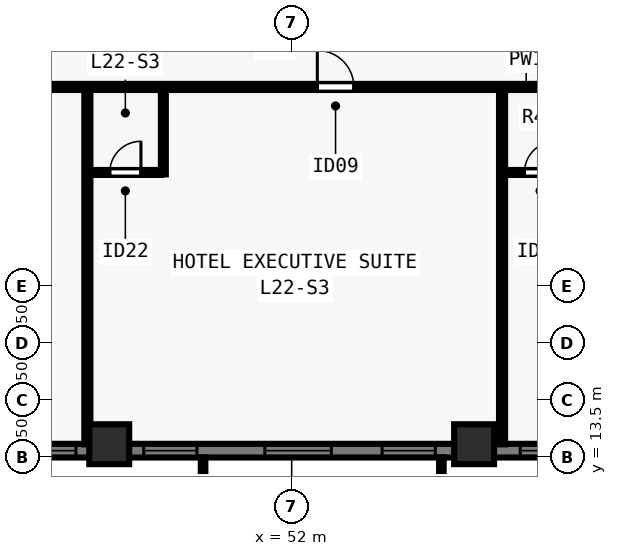
"""IFC4 building model, lengths in metres.
Left out: names, types, materials, properties, quantities, classifications, styles, units other than length and angle.
Written with IfcOpenShell. Run it as: python <this file> out.ifc"""

import sys

from ifc_helpers import new_model, si_unit, direction, frame, frame_2d, origin, origin_2d, place, context, subcontext, project, spatial, rectangle, extrude, element, fill, save


model = new_model("IFC4")
c1 = context("Model", 3, precision=1e-05, world=origin(), true_north=direction((0.0, 1.0)))
c2 = subcontext(c1, "Body", "Model", "MODEL_VIEW")
j1 = project(units=[si_unit("LENGTHUNIT", "METRE"), si_unit("PLANEANGLEUNIT", "RADIAN")], contexts=[c1])
p1 = place(None, origin())
s1 = spatial("IfcSite", under=j1, at=p1, CompositionType="ELEMENT")
p2 = place(p1, origin())
s2 = spatial("IfcBuilding", under=s1, at=p2, CompositionType="ELEMENT")
p3 = place(p2, frame((0.0, 0.0, 83.0)))
s3 = spatial("IfcBuildingStorey", under=s2, at=p3, CompositionType="ELEMENT", Elevation=83.0)
for number, where, z_axis, x_axis in (
    (1, (47.2, 13.85, 0.0), (0.0, 0.0, 1.0), (1.0, 0.0, 0.0)),
    (2, (56.8, 13.85, 0.0), (0.0, 0.0, 1.0), (1.0, 0.0, 0.0)),
):
    element("IfcColumn", number, at=place(p3, frame(where, z_axis=z_axis, x_axis=x_axis)), inside=s3, PredefinedType="COLUMN", context=c2, shape_type="SweptSolid", body=[
        extrude(rectangle(XDim=1.05, YDim=1.05, at=origin_2d()), origin(), (0.0, 0.0, 1.0), 3.5),
    ])
p4 = place(p3, frame((74.5, 13.68, 0.0), z_axis=(0.0, 0.0, 1.0), x_axis=(-1.0, 0.0, 0.0)))
e3 = element("IfcWall", 3, at=p4, inside=s3, PredefinedType="SOLIDWALL", context=c2, shape_type="SweptSolid", body=[
    extrude(rectangle(XDim=44.662, YDim=0.36, at=frame_2d((22.331, 0.0))), origin(), (0.0, 0.0, 1.0), 3.28),
])
p5 = place(p4, frame((4.83, 0.0, 0.8)))
e4 = element("IfcOpeningElement", 4, at=p5, cuts=e3, PredefinedType="OPENING", context=c2, shape_type="SweptSolid", body=[
    extrude(rectangle(XDim=1.4, YDim=1.544, at=frame_2d((0.7, 0.772))), frame((0.0, 0.19, 0.0), z_axis=(0.0, -1.0, 0.0), x_axis=(1.0, 0.0, 0.0)), (0.0, 0.0, 1.0), 0.38),
])
p6 = place(p4, frame((8.465, 0.0, 0.8)))
e5 = element("IfcOpeningElement", 5, at=p6, cuts=e3, PredefinedType="OPENING", context=c2, shape_type="SweptSolid", body=[
    extrude(rectangle(XDim=1.75, YDim=1.544, at=frame_2d((0.875, 0.772))), frame((0.0, 0.19, 0.0), z_axis=(0.0, -1.0, 0.0), x_axis=(1.0, 0.0, 0.0)), (0.0, 0.0, 1.0), 0.38),
])
p7 = place(p4, frame((11.551, 0.0, 0.8)))
e6 = element("IfcOpeningElement", 6, at=p7, cuts=e3, PredefinedType="OPENING", context=c2, shape_type="SweptSolid", body=[
    extrude(rectangle(XDim=1.4, YDim=1.544, at=frame_2d((0.7, 0.772))), frame((0.0, 0.19, 0.0), z_axis=(0.0, -1.0, 0.0), x_axis=(1.0, 0.0, 0.0)), (0.0, 0.0, 1.0), 0.38),
])
p8 = place(p4, frame((14.736, 0.0, 0.8)))
e7 = element("IfcOpeningElement", 7, at=p8, cuts=e3, PredefinedType="OPENING", context=c2, shape_type="SweptSolid", body=[
    extrude(rectangle(XDim=1.75, YDim=1.544, at=frame_2d((0.875, 0.772))), frame((0.0, 0.19, 0.0), z_axis=(0.0, -1.0, 0.0), x_axis=(1.0, 0.0, 0.0)), (0.0, 0.0, 1.0), 0.38),
])
p9 = place(p4, frame((18.721, 0.0, 0.8)))
e8 = element("IfcOpeningElement", 8, at=p9, cuts=e3, PredefinedType="OPENING", context=c2, shape_type="SweptSolid", body=[
    extrude(rectangle(XDim=1.4, YDim=1.544, at=frame_2d((0.7, 0.772))), frame((0.0, 0.19, 0.0), z_axis=(0.0, -1.0, 0.0), x_axis=(1.0, 0.0, 0.0)), (0.0, 0.0, 1.0), 0.38),
])
p10 = place(p4, frame((21.456, 0.0, 0.8)))
e9 = element("IfcOpeningElement", 9, at=p10, cuts=e3, PredefinedType="OPENING", context=c2, shape_type="SweptSolid", body=[
    extrude(rectangle(XDim=1.75, YDim=1.544, at=frame_2d((0.875, 0.772))), frame((0.0, 0.19, 0.0), z_axis=(0.0, -1.0, 0.0), x_axis=(1.0, 0.0, 0.0)), (0.0, 0.0, 1.0), 0.38),
])
p11 = place(p4, frame((24.991, 0.0, 0.8)))
e10 = element("IfcOpeningElement", 10, at=p11, cuts=e3, PredefinedType="OPENING", context=c2, shape_type="SweptSolid", body=[
    extrude(rectangle(XDim=1.4, YDim=1.544, at=frame_2d((0.7, 0.772))), frame((0.0, 0.19, 0.0), z_axis=(0.0, -1.0, 0.0), x_axis=(1.0, 0.0, 0.0)), (0.0, 0.0, 1.0), 0.38),
])
p12 = place(p4, frame((28.177, 0.0, 0.8)))
e11 = element("IfcOpeningElement", 11, at=p12, cuts=e3, PredefinedType="OPENING", context=c2, shape_type="SweptSolid", body=[
    extrude(rectangle(XDim=1.75, YDim=1.544, at=frame_2d((0.875, 0.772))), frame((0.0, 0.19, 0.0), z_axis=(0.0, -1.0, 0.0), x_axis=(1.0, 0.0, 0.0)), (0.0, 0.0, 1.0), 0.38),
])
p13 = place(p4, frame((31.711, 0.0, 0.8)))
e12 = element("IfcOpeningElement", 12, at=p13, cuts=e3, PredefinedType="OPENING", context=c2, shape_type="SweptSolid", body=[
    extrude(rectangle(XDim=1.4, YDim=1.544, at=frame_2d((0.7, 0.772))), frame((0.0, 0.19, 0.0), z_axis=(0.0, -1.0, 0.0), x_axis=(1.0, 0.0, 0.0)), (0.0, 0.0, 1.0), 0.38),
])
p14 = place(p4, frame((34.897, 0.0, 0.8)))
e13 = element("IfcOpeningElement", 13, at=p14, cuts=e3, PredefinedType="OPENING", context=c2, shape_type="SweptSolid", body=[
    extrude(rectangle(XDim=1.75, YDim=1.544, at=frame_2d((0.875, 0.772))), frame((0.0, 0.19, 0.0), z_axis=(0.0, -1.0, 0.0), x_axis=(1.0, 0.0, 0.0)), (0.0, 0.0, 1.0), 0.38),
])
p15 = place(p4, frame((38.432, 0.0, 0.8)))
e14 = element("IfcOpeningElement", 14, at=p15, cuts=e3, PredefinedType="OPENING", context=c2, shape_type="SweptSolid", body=[
    extrude(rectangle(XDim=1.4, YDim=1.544, at=frame_2d((0.7, 0.772))), frame((0.0, 0.19, 0.0), z_axis=(0.0, -1.0, 0.0), x_axis=(1.0, 0.0, 0.0)), (0.0, 0.0, 1.0), 0.38),
])
p16 = place(p3, frame((36.55, 23.25, 0.0), z_axis=(0.0, 0.0, 1.0), x_axis=(1.0, 0.0, 0.0)))
e15 = element("IfcWall", 15, at=p16, inside=s3, PredefinedType="PARTITIONING", context=c2, shape_type="SweptSolid", body=[
    extrude(rectangle(XDim=30.9, YDim=0.16, at=frame_2d((15.45, 0.0))), origin(), (0.0, 0.0, 1.0), 3.28),
])
p17 = place(p16, frame((1.13, 0.0, 0.0)))
e16 = element("IfcOpeningElement", 16, at=p17, cuts=e15, PredefinedType="OPENING", context=c2, shape_type="SweptSolid", body=[
    extrude(rectangle(XDim=0.96, YDim=2.15, at=frame_2d((0.48, 1.075))), frame((0.0, 0.09, 0.0), z_axis=(0.0, -1.0, 0.0), x_axis=(1.0, 0.0, 0.0)), (0.0, 0.0, 1.0), 0.18),
])
p18 = place(p16, frame((6.093, 0.0, 0.0)))
e17 = element("IfcOpeningElement", 17, at=p18, cuts=e15, PredefinedType="OPENING", context=c2, shape_type="SweptSolid", body=[
    extrude(rectangle(XDim=0.96, YDim=2.15, at=frame_2d((0.48, 1.075))), frame((0.0, 0.09, 0.0), z_axis=(0.0, -1.0, 0.0), x_axis=(1.0, 0.0, 0.0)), (0.0, 0.0, 1.0), 0.18),
])
p19 = place(p16, frame((16.125, 0.0, 0.0)))
e18 = element("IfcOpeningElement", 18, at=p19, cuts=e15, PredefinedType="OPENING", context=c2, shape_type="SweptSolid", body=[
    extrude(rectangle(XDim=0.96, YDim=2.15, at=frame_2d((0.48, 1.075))), frame((0.0, 0.09, 0.0), z_axis=(0.0, -1.0, 0.0), x_axis=(1.0, 0.0, 0.0)), (0.0, 0.0, 1.0), 0.18),
])
p20 = place(p16, frame((26.157, 0.0, 0.0)))
e19 = element("IfcOpeningElement", 19, at=p20, cuts=e15, PredefinedType="OPENING", context=c2, shape_type="SweptSolid", body=[
    extrude(rectangle(XDim=0.96, YDim=2.15, at=frame_2d((0.48, 1.075))), frame((0.0, 0.09, 0.0), z_axis=(0.0, -1.0, 0.0), x_axis=(1.0, 0.0, 0.0)), (0.0, 0.0, 1.0), 0.18),
])
p21 = place(p16, frame((28.92, 0.0, 0.0)))
e20 = element("IfcOpeningElement", 20, at=p21, cuts=e15, PredefinedType="OPENING", context=c2, shape_type="SweptSolid", body=[
    extrude(rectangle(XDim=0.96, YDim=2.15, at=frame_2d((0.48, 1.075))), frame((0.0, 0.09, 0.0), z_axis=(0.0, -1.0, 0.0), x_axis=(1.0, 0.0, 0.0)), (0.0, 0.0, 1.0), 0.18),
])
p22 = place(p3, frame((46.624, 13.845, 0.0), z_axis=(0.0, 0.0, 1.0), x_axis=(0.0, 1.0, 0.0)))
e21 = element("IfcWall", 21, at=p22, inside=s3, PredefinedType="PARTITIONING", context=c2, shape_type="SweptSolid", body=[
    extrude(rectangle(XDim=9.34, YDim=0.16, at=frame_2d((4.67, 0.0))), origin(), (0.0, 0.0, 1.0), 3.28),
])
p23 = place(p3, frame((48.624, 20.95, 0.0), z_axis=(0.0, 0.0, 1.0), x_axis=(0.0, 1.0, 0.0)))
e22 = element("IfcWall", 22, at=p23, inside=s3, PredefinedType="PLUMBINGWALL", context=c2, shape_type="SweptSolid", body=[
    extrude(rectangle(XDim=2.235, YDim=0.13, at=frame_2d((1.118, 0.0))), origin(), (0.0, 0.0, 1.0), 3.28),
])
p24 = place(p3, frame((46.689, 21.0, 0.0), z_axis=(0.0, 0.0, 1.0), x_axis=(1.0, 0.0, 0.0)))
e23 = element("IfcWall", 23, at=p24, inside=s3, PredefinedType="PLUMBINGWALL", context=c2, shape_type="SweptSolid", body=[
    extrude(rectangle(XDim=1.885, YDim=0.13, at=frame_2d((0.942, 0.0))), origin(), (0.0, 0.0, 1.0), 3.28),
])
p25 = place(p24, frame((0.525, 0.0, 0.0)))
e24 = element("IfcOpeningElement", 24, at=p25, cuts=e23, PredefinedType="OPENING", context=c2, shape_type="SweptSolid", body=[
    extrude(rectangle(XDim=0.82, YDim=2.1, at=frame_2d((0.41, 1.05))), frame((0.0, 0.075, 0.0), z_axis=(0.0, -1.0, 0.0), x_axis=(1.0, 0.0, 0.0)), (0.0, 0.0, 1.0), 0.15),
])
p26 = place(p3, frame((57.536, 13.845, 0.0), z_axis=(0.0, 0.0, 1.0), x_axis=(0.0, 1.0, 0.0)))
e25 = element("IfcWall", 25, at=p26, inside=s3, PredefinedType="PARTITIONING", context=c2, shape_type="SweptSolid", body=[
    extrude(rectangle(XDim=9.34, YDim=0.16, at=frame_2d((4.67, 0.0))), origin(), (0.0, 0.0, 1.0), 3.28),
])
p27 = place(p3, frame((57.601, 21.0, 0.0), z_axis=(0.0, 0.0, 1.0), x_axis=(1.0, 0.0, 0.0)))
e26 = element("IfcWall", 26, at=p27, inside=s3, PredefinedType="PLUMBINGWALL", context=c2, shape_type="SweptSolid", body=[
    extrude(rectangle(XDim=1.885, YDim=0.13, at=frame_2d((0.942, 0.0))), origin(), (0.0, 0.0, 1.0), 3.28),
])
p28 = place(p27, frame((0.525, 0.0, 0.0)))
e27 = element("IfcOpeningElement", 27, at=p28, cuts=e26, PredefinedType="OPENING", context=c2, shape_type="SweptSolid", body=[
    extrude(rectangle(XDim=0.82, YDim=2.1, at=frame_2d((0.41, 1.05))), frame((0.0, 0.075, 0.0), z_axis=(0.0, -1.0, 0.0), x_axis=(1.0, 0.0, 0.0)), (0.0, 0.0, 1.0), 0.15),
])
p29 = place(p8, origin())
e28 = element("IfcWindow", 28, at=p29, inside=s3, PartitioningType="SINGLE_PANEL", PredefinedType="WINDOW", context=c2, shape_type="SweptSolid", body=[
    extrude(rectangle(XDim=1.75, YDim=1.544, at=frame_2d((0.875, 0.772))), frame((0.0, -0.05, 0.0), z_axis=(0.0, -1.0, 0.0), x_axis=(1.0, 0.0, 0.0)), (0.0, 0.0, 1.0), 0.06),
])
fill(e7, e28)
p30 = place(p9, origin())
e29 = element("IfcWindow", 29, at=p30, inside=s3, PartitioningType="SINGLE_PANEL", PredefinedType="WINDOW", context=c2, shape_type="SweptSolid", body=[
    extrude(rectangle(XDim=1.4, YDim=1.544, at=frame_2d((0.7, 0.772))), frame((0.0, -0.05, 0.0), z_axis=(0.0, -1.0, 0.0), x_axis=(1.0, 0.0, 0.0)), (0.0, 0.0, 1.0), 0.06),
])
fill(e8, e29)
p31 = place(p10, origin())
e30 = element("IfcWindow", 30, at=p31, inside=s3, PartitioningType="SINGLE_PANEL", PredefinedType="WINDOW", context=c2, shape_type="SweptSolid", body=[
    extrude(rectangle(XDim=1.75, YDim=1.544, at=frame_2d((0.875, 0.772))), frame((0.0, -0.05, 0.0), z_axis=(0.0, -1.0, 0.0), x_axis=(1.0, 0.0, 0.0)), (0.0, 0.0, 1.0), 0.06),
])
fill(e9, e30)
p32 = place(p11, origin())
e31 = element("IfcWindow", 31, at=p32, inside=s3, PartitioningType="SINGLE_PANEL", PredefinedType="WINDOW", context=c2, shape_type="SweptSolid", body=[
    extrude(rectangle(XDim=1.4, YDim=1.544, at=frame_2d((0.7, 0.772))), frame((0.0, -0.05, 0.0), z_axis=(0.0, -1.0, 0.0), x_axis=(1.0, 0.0, 0.0)), (0.0, 0.0, 1.0), 0.06),
])
fill(e10, e31)
p33 = place(p12, origin())
e32 = element("IfcWindow", 32, at=p33, inside=s3, PartitioningType="SINGLE_PANEL", PredefinedType="WINDOW", context=c2, shape_type="SweptSolid", body=[
    extrude(rectangle(XDim=1.75, YDim=1.544, at=frame_2d((0.875, 0.772))), frame((0.0, -0.05, 0.0), z_axis=(0.0, -1.0, 0.0), x_axis=(1.0, 0.0, 0.0)), (0.0, 0.0, 1.0), 0.06),
])
fill(e11, e32)
p34 = place(p25, origin())
e33 = element("IfcDoor", 33, at=p34, inside=s3, OperationType="SINGLE_SWING_RIGHT", PredefinedType="DOOR", context=c2, shape_type="SweptSolid", body=[
    extrude(rectangle(XDim=0.82, YDim=2.1, at=frame_2d((0.41, 1.05))), frame((0.0, 0.025, 0.0), z_axis=(0.0, -1.0, 0.0), x_axis=(1.0, 0.0, 0.0)), (0.0, 0.0, 1.0), 0.05),
])
fill(e24, e33)
p35 = place(p19, origin())
e34 = element("IfcDoor", 34, at=p35, inside=s3, OperationType="SINGLE_SWING_LEFT", PredefinedType="DOOR", context=c2, shape_type="SweptSolid", body=[
    extrude(rectangle(XDim=0.96, YDim=2.15, at=frame_2d((0.48, 1.075))), frame((0.0, 0.025, 0.0), z_axis=(0.0, -1.0, 0.0), x_axis=(1.0, 0.0, 0.0)), (0.0, 0.0, 1.0), 0.05),
])
fill(e18, e34)
p36 = place(p28, origin())
e35 = element("IfcDoor", 35, at=p36, inside=s3, OperationType="SINGLE_SWING_RIGHT", PredefinedType="DOOR", context=c2, shape_type="SweptSolid", body=[
    extrude(rectangle(XDim=0.82, YDim=2.1, at=frame_2d((0.41, 1.05))), frame((0.0, 0.025, 0.0), z_axis=(0.0, -1.0, 0.0), x_axis=(1.0, 0.0, 0.0)), (0.0, 0.0, 1.0), 0.05),
])
fill(e27, e35)
save(model, sys.argv[1])
